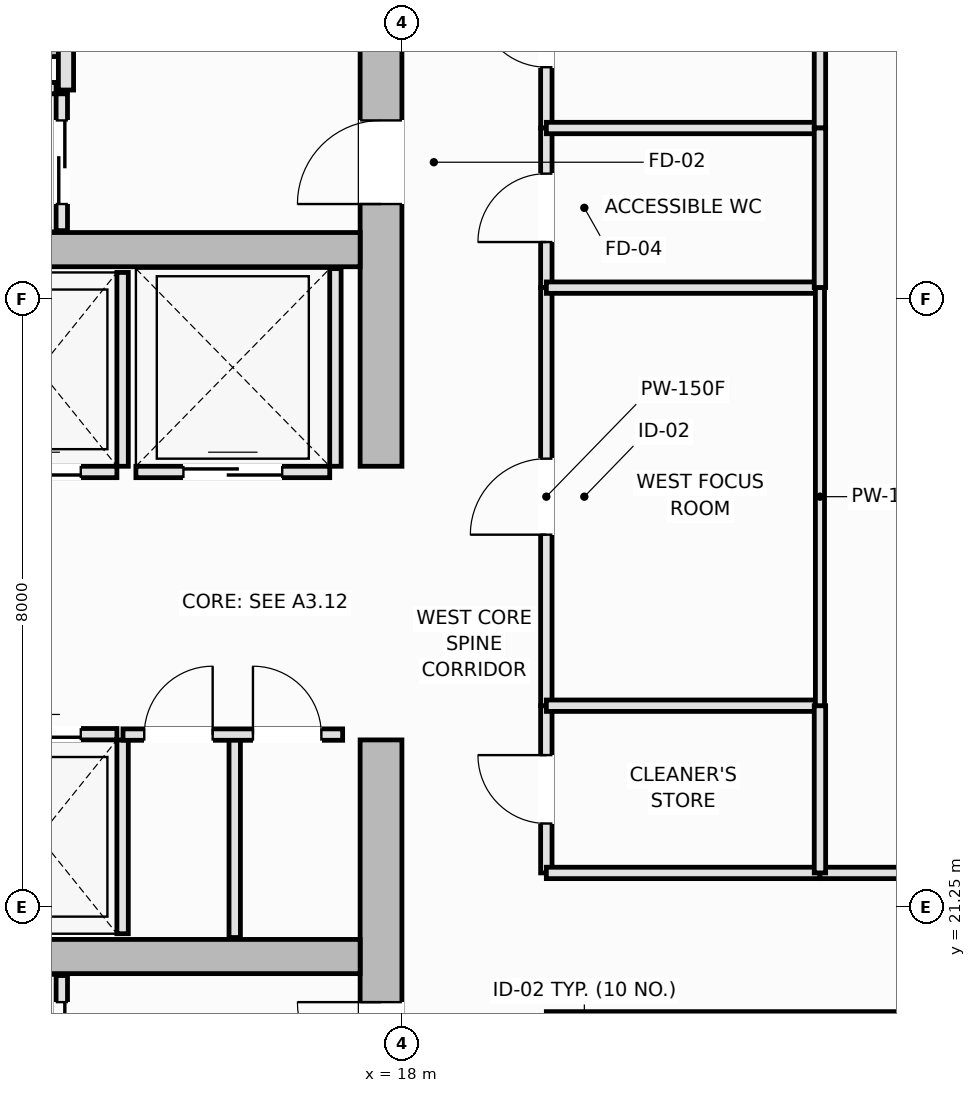
"""IFC4 building model, lengths in metres.
Left out: names, types, materials, properties, quantities, classifications, styles, units other than length and angle.
Written with IfcOpenShell. Run it as: python <this file> out.ifc"""

import sys

from ifc_helpers import new_model, si_unit, direction, frame, frame_2d, origin, place, context, subcontext, project, spatial, rectangle, extrude, element, fill, save


model = new_model("IFC4")
c1 = context("Model", 3, precision=1e-05, world=origin(), true_north=direction((0.0, 1.0)))
c2 = subcontext(c1, "Body", "Model", "MODEL_VIEW")
j1 = project(units=[si_unit("LENGTHUNIT", "METRE"), si_unit("PLANEANGLEUNIT", "RADIAN")], contexts=[c1])
p1 = place(None, origin())
s1 = spatial("IfcSite", under=j1, at=p1, CompositionType="ELEMENT")
p2 = place(p1, origin())
s2 = spatial("IfcBuilding", under=s1, at=p2, CompositionType="ELEMENT")
p3 = place(p2, frame((0.0, 0.0, 223.55)))
s3 = spatial("IfcBuildingStorey", under=s2, at=p3, CompositionType="ELEMENT", Elevation=223.55)
p4 = place(p3, frame((17.725, 14.55, 0.0), z_axis=(0.0, 0.0, 1.0), x_axis=(0.0, 1.0, 0.0)))
e1 = element("IfcWall", 1, at=p4, inside=s3, PredefinedType="SHEAR", context=c2, shape_type="SweptSolid", body=[
    extrude(rectangle(XDim=8.9, YDim=0.55, at=frame_2d((4.45, 0.0))), origin(), (0.0, 0.0, 1.0), 3.55),
])
p5 = place(p4, frame((4.35, 0.0, 0.0)))
e2 = element("IfcOpeningElement", 2, at=p5, cuts=e1, PredefinedType="OPENING", context=c2, shape_type="SweptSolid", body=[
    extrude(rectangle(XDim=1.1, YDim=2.15, at=frame_2d((0.55, 1.075))), frame((0.0, 0.285, 0.0), z_axis=(0.0, -1.0, 0.0), x_axis=(1.0, 0.0, 0.0)), (0.0, 0.0, 1.0), 0.57),
])
p6 = place(p3, frame((17.725, 27.05, 0.0), z_axis=(0.0, 0.0, 1.0), x_axis=(0.0, 1.0, 0.0)))
e3 = element("IfcWall", 3, at=p6, inside=s3, PredefinedType="SHEAR", context=c2, shape_type="SweptSolid", body=[
    extrude(rectangle(XDim=8.9, YDim=0.55, at=frame_2d((4.45, 0.0))), origin(), (0.0, 0.0, 1.0), 3.55),
])
p7 = place(p6, frame((3.45, 0.0, 0.0)))
e4 = element("IfcOpeningElement", 4, at=p7, cuts=e3, PredefinedType="OPENING", context=c2, shape_type="SweptSolid", body=[
    extrude(rectangle(XDim=1.1, YDim=2.15, at=frame_2d((0.55, 1.075))), frame((0.0, 0.285, 0.0), z_axis=(0.0, -1.0, 0.0), x_axis=(1.0, 0.0, 0.0)), (0.0, 0.0, 1.0), 0.57),
])
for number, where, z_axis, x_axis in (
    (5, (5.05, 20.6, 0.0), (0.0, 0.0, 1.0), (1.0, 0.0, 0.0)),
    (6, (5.05, 29.9, 0.0), (0.0, 0.0, 1.0), (1.0, 0.0, 0.0)),
):
    element("IfcWall", number, at=place(p3, frame(where, z_axis=z_axis, x_axis=x_axis)), inside=s3, PredefinedType="SHEAR", context=c2, shape_type="SweptSolid", body=[
        extrude(rectangle(XDim=12.4, YDim=0.45, at=frame_2d((6.2, 0.0))), origin(), (0.0, 0.0, 1.0), 3.55),
    ])
p8 = place(p3, frame((5.9, 32.54, 0.0), z_axis=(0.0, 0.0, 1.0), x_axis=(1.0, 0.0, 0.0)))
e7 = element("IfcWall", 7, at=p8, inside=s3, PredefinedType="SOLIDWALL", context=c2, shape_type="SweptSolid", body=[
    extrude(rectangle(XDim=7.66, YDim=0.2, at=frame_2d((3.83, 0.0))), origin(), (0.0, 0.0, 1.0), 3.55),
])
p9 = place(p3, frame((12.2, 23.525, 0.0), z_axis=(0.0, 0.0, 1.0), x_axis=(1.0, 0.0, 0.0)))
e8 = element("IfcWall", 8, at=p9, inside=s3, PredefinedType="PARTITIONING", context=c2, shape_type="SweptSolid", body=[
    extrude(rectangle(XDim=2.05, YDim=0.15, at=frame_2d((1.025, 0.0))), origin(), (0.0, 0.0, 1.0), 3.37),
])
p10 = place(p9, frame((0.475, 0.0, 0.0)))
e9 = element("IfcOpeningElement", 9, at=p10, cuts=e8, PredefinedType="OPENING", context=c2, shape_type="SweptSolid", body=[
    extrude(rectangle(XDim=1.1, YDim=2.2, at=frame_2d((0.55, 1.1))), frame((0.0, 0.085, 0.0), z_axis=(0.0, -1.0, 0.0), x_axis=(1.0, 0.0, 0.0)), (0.0, 0.0, 1.0), 0.17),
])
p11 = place(p3, frame((14.325, 20.9, 0.0), z_axis=(0.0, 0.0, 1.0), x_axis=(0.0, 1.0, 0.0)))
e10 = element("IfcWall", 10, at=p11, inside=s3, PredefinedType="PARTITIONING", context=c2, shape_type="SweptSolid", body=[
    extrude(rectangle(XDim=2.55, YDim=0.15, at=frame_2d((1.275, 0.0))), origin(), (0.0, 0.0, 1.0), 3.37),
])
p12 = place(p3, frame((12.2, 26.975, 0.0), z_axis=(0.0, 0.0, 1.0), x_axis=(1.0, 0.0, 0.0)))
e11 = element("IfcWall", 11, at=p12, inside=s3, PredefinedType="PARTITIONING", context=c2, shape_type="SweptSolid", body=[
    extrude(rectangle(XDim=2.05, YDim=0.15, at=frame_2d((1.025, 0.0))), origin(), (0.0, 0.0, 1.0), 3.37),
])
p13 = place(p12, frame((0.475, 0.0, 0.0)))
e12 = element("IfcOpeningElement", 12, at=p13, cuts=e11, PredefinedType="OPENING", context=c2, shape_type="SweptSolid", body=[
    extrude(rectangle(XDim=1.1, YDim=2.2, at=frame_2d((0.55, 1.1))), frame((0.0, 0.085, 0.0), z_axis=(0.0, -1.0, 0.0), x_axis=(1.0, 0.0, 0.0)), (0.0, 0.0, 1.0), 0.17),
])
p14 = place(p3, frame((14.325, 27.05, 0.0), z_axis=(0.0, 0.0, 1.0), x_axis=(0.0, 1.0, 0.0)))
e13 = element("IfcWall", 13, at=p14, inside=s3, PredefinedType="PARTITIONING", context=c2, shape_type="SweptSolid", body=[
    extrude(rectangle(XDim=2.55, YDim=0.15, at=frame_2d((1.275, 0.0))), origin(), (0.0, 0.0, 1.0), 3.37),
])
p15 = place(p3, frame((14.5, 26.975, 0.0), z_axis=(0.0, 0.0, 1.0), x_axis=(1.0, 0.0, 0.0)))
e14 = element("IfcWall", 14, at=p15, inside=s3, PredefinedType="PARTITIONING", context=c2, shape_type="SweptSolid", body=[
    extrude(rectangle(XDim=2.55, YDim=0.15, at=frame_2d((1.275, 0.0))), origin(), (0.0, 0.0, 1.0), 3.37),
])
p16 = place(p15, frame((0.625, 0.0, 0.0)))
e15 = element("IfcOpeningElement", 15, at=p16, cuts=e14, PredefinedType="OPENING", context=c2, shape_type="SweptSolid", body=[
    extrude(rectangle(XDim=1.3, YDim=2.2, at=frame_2d((0.65, 1.1))), frame((0.0, 0.085, 0.0), z_axis=(0.0, -1.0, 0.0), x_axis=(1.0, 0.0, 0.0)), (0.0, 0.0, 1.0), 0.17),
])
p17 = place(p3, frame((17.125, 27.05, 0.0), z_axis=(0.0, 0.0, 1.0), x_axis=(0.0, 1.0, 0.0)))
e16 = element("IfcWall", 16, at=p17, inside=s3, PredefinedType="PARTITIONING", context=c2, shape_type="SweptSolid", body=[
    extrude(rectangle(XDim=2.6, YDim=0.15, at=frame_2d((1.3, 0.0))), origin(), (0.0, 0.0, 1.0), 3.37),
])
p18 = place(p3, frame((13.525, 18.55, 0.0), z_axis=(0.0, 0.0, 1.0), x_axis=(0.0, 1.0, 0.0)))
e17 = element("IfcWall", 17, at=p18, inside=s3, PredefinedType="PARTITIONING", context=c2, shape_type="SweptSolid", body=[
    extrude(rectangle(XDim=1.8, YDim=0.15, at=frame_2d((0.9, 0.0))), origin(), (0.0, 0.0, 1.0), 3.37),
])
p19 = place(p18, frame((0.35, 0.0, 0.0)))
e18 = element("IfcOpeningElement", 18, at=p19, cuts=e17, PredefinedType="OPENING", context=c2, shape_type="SweptSolid", body=[
    extrude(rectangle(XDim=1.1, YDim=2.2, at=frame_2d((0.55, 1.1))), frame((0.0, 0.085, 0.0), z_axis=(0.0, -1.0, 0.0), x_axis=(1.0, 0.0, 0.0)), (0.0, 0.0, 1.0), 0.17),
])
p20 = place(p3, frame((10.95, 32.025, 0.0), z_axis=(0.0, 0.0, 1.0), x_axis=(1.0, 0.0, 0.0)))
e19 = element("IfcWall", 19, at=p20, inside=s3, PredefinedType="PARTITIONING", context=c2, shape_type="SweptSolid", body=[
    extrude(rectangle(XDim=2.5, YDim=0.15, at=frame_2d((1.25, 0.0))), origin(), (0.0, 0.0, 1.0), 3.37),
])
p21 = place(p3, frame((13.525, 30.15, 0.0), z_axis=(0.0, 0.0, 1.0), x_axis=(0.0, 1.0, 0.0)))
e20 = element("IfcWall", 20, at=p21, inside=s3, PredefinedType="PARTITIONING", context=c2, shape_type="SweptSolid", body=[
    extrude(rectangle(XDim=1.8, YDim=0.15, at=frame_2d((0.9, 0.0))), origin(), (0.0, 0.0, 1.0), 3.37),
])
p22 = place(p21, frame((0.35, 0.0, 0.0)))
e21 = element("IfcOpeningElement", 21, at=p22, cuts=e20, PredefinedType="OPENING", context=c2, shape_type="SweptSolid", body=[
    extrude(rectangle(XDim=1.1, YDim=2.2, at=frame_2d((0.55, 1.1))), frame((0.0, 0.085, 0.0), z_axis=(0.0, -1.0, 0.0), x_axis=(1.0, 0.0, 0.0)), (0.0, 0.0, 1.0), 0.17),
])
p23 = place(p3, frame((13.58, 32.0, 0.0), z_axis=(0.0, 0.0, 1.0), x_axis=(0.0, 1.0, 0.0)))
e22 = element("IfcWall", 22, at=p23, inside=s3, PredefinedType="PARTITIONING", context=c2, shape_type="SweptSolid", body=[
    extrude(rectangle(XDim=0.54, YDim=0.2, at=frame_2d((0.27, 0.0))), origin(), (0.0, 0.0, 1.0), 3.37),
])
p24 = place(p3, frame((15.8, 20.85, 0.0), z_axis=(0.0, 0.0, 1.0), x_axis=(0.0, 1.0, 0.0)))
e23 = element("IfcWall", 23, at=p24, inside=s3, PredefinedType="PARTITIONING", context=c2, shape_type="SweptSolid", body=[
    extrude(rectangle(XDim=2.67, YDim=0.15, at=frame_2d((1.335, 0.0))), origin(), (0.0, 0.0, 1.0), 3.37),
])
p25 = place(p3, frame((14.33, 23.52, 0.0), z_axis=(0.0, 0.0, 1.0), x_axis=(1.0, 0.0, 0.0)))
e24 = element("IfcWall", 24, at=p25, inside=s3, PredefinedType="PARTITIONING", context=c2, shape_type="SweptSolid", body=[
    extrude(rectangle(XDim=2.89, YDim=0.15, at=frame_2d((1.445, 0.0))), origin(), (0.0, 0.0, 1.0), 3.37),
])
p26 = place(p25, frame((0.28, 0.0, 0.0)))
e25 = element("IfcOpeningElement", 25, at=p26, cuts=e24, PredefinedType="OPENING", context=c2, shape_type="SweptSolid", body=[
    extrude(rectangle(XDim=0.9, YDim=2.1, at=frame_2d((0.45, 1.05))), frame((0.0, 0.085, 0.0), z_axis=(0.0, -1.0, 0.0), x_axis=(1.0, 0.0, 0.0)), (0.0, 0.0, 1.0), 0.17),
])
p27 = place(p25, frame((1.71, 0.0, 0.0)))
e26 = element("IfcOpeningElement", 26, at=p27, cuts=e24, PredefinedType="OPENING", context=c2, shape_type="SweptSolid", body=[
    extrude(rectangle(XDim=0.9, YDim=2.1, at=frame_2d((0.45, 1.05))), frame((0.0, 0.085, 0.0), z_axis=(0.0, -1.0, 0.0), x_axis=(1.0, 0.0, 0.0)), (0.0, 0.0, 1.0), 0.17),
])
p28 = place(p3, frame((19.9, 31.5, 0.0), z_axis=(0.0, 0.0, 1.0), x_axis=(0.0, 1.0, 0.0)))
e27 = element("IfcWall", 27, at=p28, inside=s3, PredefinedType="PLUMBINGWALL", context=c2, shape_type="SweptSolid", body=[
    extrude(rectangle(XDim=2.5, YDim=0.15, at=frame_2d((1.25, 0.0))), origin(), (0.0, 0.0, 1.0), 3.37),
])
p29 = place(p28, frame((0.8, 0.0, 0.0)))
e28 = element("IfcOpeningElement", 28, at=p29, cuts=e27, PredefinedType="OPENING", context=c2, shape_type="SweptSolid", body=[
    extrude(rectangle(XDim=0.9, YDim=2.1, at=frame_2d((0.45, 1.05))), frame((0.0, 0.085, 0.0), z_axis=(0.0, -1.0, 0.0), x_axis=(1.0, 0.0, 0.0)), (0.0, 0.0, 1.0), 0.17),
])
p30 = place(p3, frame((19.9, 29.4, 0.0), z_axis=(0.0, 0.0, 1.0), x_axis=(0.0, 1.0, 0.0)))
e29 = element("IfcWall", 29, at=p30, inside=s3, PredefinedType="PLUMBINGWALL", context=c2, shape_type="SweptSolid", body=[
    extrude(rectangle(XDim=2.1, YDim=0.15, at=frame_2d((1.05, 0.0))), origin(), (0.0, 0.0, 1.0), 3.37),
])
p31 = place(p30, frame((0.6, 0.0, 0.0)))
e30 = element("IfcOpeningElement", 30, at=p31, cuts=e29, PredefinedType="OPENING", context=c2, shape_type="SweptSolid", body=[
    extrude(rectangle(XDim=0.9, YDim=2.1, at=frame_2d((0.45, 1.05))), frame((0.0, 0.085, 0.0), z_axis=(0.0, -1.0, 0.0), x_axis=(1.0, 0.0, 0.0)), (0.0, 0.0, 1.0), 0.17),
])
p32 = place(p3, frame((19.9, 21.7, 0.0), z_axis=(0.0, 0.0, 1.0), x_axis=(0.0, 1.0, 0.0)))
e31 = element("IfcWall", 31, at=p32, inside=s3, PredefinedType="PLUMBINGWALL", context=c2, shape_type="SweptSolid", body=[
    extrude(rectangle(XDim=2.2, YDim=0.15, at=frame_2d((1.1, 0.0))), origin(), (0.0, 0.0, 1.0), 3.37),
])
p33 = place(p32, frame((0.65, 0.0, 0.0)))
e32 = element("IfcOpeningElement", 32, at=p33, cuts=e31, PredefinedType="OPENING", context=c2, shape_type="SweptSolid", body=[
    extrude(rectangle(XDim=0.9, YDim=2.1, at=frame_2d((0.45, 1.05))), frame((0.0, 0.085, 0.0), z_axis=(0.0, -1.0, 0.0), x_axis=(1.0, 0.0, 0.0)), (0.0, 0.0, 1.0), 0.17),
])
p34 = place(p3, frame((19.9, 23.9, 0.0), z_axis=(0.0, 0.0, 1.0), x_axis=(0.0, 1.0, 0.0)))
e33 = element("IfcWall", 33, at=p34, inside=s3, PredefinedType="PARTITIONING", context=c2, shape_type="SweptSolid", body=[
    extrude(rectangle(XDim=5.5, YDim=0.15, at=frame_2d((2.75, 0.0))), origin(), (0.0, 0.0, 1.0), 3.37),
])
p35 = place(p34, frame((2.25, 0.0, 0.0)))
e34 = element("IfcOpeningElement", 34, at=p35, cuts=e33, PredefinedType="OPENING", context=c2, shape_type="SweptSolid", body=[
    extrude(rectangle(XDim=1.0, YDim=2.15, at=frame_2d((0.5, 1.075))), frame((0.0, 0.085, 0.0), z_axis=(0.0, -1.0, 0.0), x_axis=(1.0, 0.0, 0.0)), (0.0, 0.0, 1.0), 0.17),
])
p36 = place(p3, frame((19.9, 19.8, 0.0), z_axis=(0.0, 0.0, 1.0), x_axis=(1.0, 0.0, 0.0)))
e35 = element("IfcWall", 35, at=p36, inside=s3, PredefinedType="PARTITIONING", context=c2, shape_type="SweptSolid", body=[
    extrude(rectangle(XDim=6.23, YDim=0.15, at=frame_2d((3.115, 0.0))), origin(), (0.0, 0.0, 1.0), 3.37),
])
p37 = place(p3, frame((19.9, 21.7, 0.0), z_axis=(0.0, 0.0, 1.0), x_axis=(1.0, 0.0, 0.0)))
e36 = element("IfcWall", 36, at=p37, inside=s3, PredefinedType="PLUMBINGWALL", context=c2, shape_type="SweptSolid", body=[
    extrude(rectangle(XDim=3.6, YDim=0.15, at=frame_2d((1.8, 0.0))), origin(), (0.0, 0.0, 1.0), 3.37),
])
p38 = place(p3, frame((23.5, 21.7, 0.0), z_axis=(0.0, 0.0, 1.0), x_axis=(1.0, 0.0, 0.0)))
e37 = element("IfcWall", 37, at=p38, inside=s3, PredefinedType="PARTITIONING", context=c2, shape_type="SweptSolid", body=[
    extrude(rectangle(XDim=12.8, YDim=0.15, at=frame_2d((6.4, 0.0))), origin(), (0.0, 0.0, 1.0), 3.37),
])
p39 = place(p38, frame((5.9, 0.0, 0.0)))
e38 = element("IfcOpeningElement", 38, at=p39, cuts=e37, PredefinedType="OPENING", context=c2, shape_type="SweptSolid", body=[
    extrude(rectangle(XDim=1.0, YDim=2.15, at=frame_2d((0.5, 1.075))), frame((0.0, 0.085, 0.0), z_axis=(0.0, -1.0, 0.0), x_axis=(1.0, 0.0, 0.0)), (0.0, 0.0, 1.0), 0.17),
])
p40 = place(p3, frame((19.9, 31.5, 0.0), z_axis=(0.0, 0.0, 1.0), x_axis=(1.0, 0.0, 0.0)))
e39 = element("IfcWall", 39, at=p40, inside=s3, PredefinedType="PLUMBINGWALL", context=c2, shape_type="SweptSolid", body=[
    extrude(rectangle(XDim=3.6, YDim=0.15, at=frame_2d((1.8, 0.0))), origin(), (0.0, 0.0, 1.0), 3.37),
])
p41 = place(p3, frame((23.5, 31.5, 0.0), z_axis=(0.0, 0.0, 1.0), x_axis=(0.0, 1.0, 0.0)))
e40 = element("IfcWall", 40, at=p41, inside=s3, PredefinedType="PLUMBINGWALL", context=c2, shape_type="SweptSolid", body=[
    extrude(rectangle(XDim=1.2, YDim=0.15, at=frame_2d((0.6, 0.0))), origin(), (0.0, 0.0, 1.0), 3.37),
])
p42 = place(p3, frame((19.9, 29.4, 0.0), z_axis=(0.0, 0.0, 1.0), x_axis=(1.0, 0.0, 0.0)))
e41 = element("IfcWall", 41, at=p42, inside=s3, PredefinedType="PLUMBINGWALL", context=c2, shape_type="SweptSolid", body=[
    extrude(rectangle(XDim=3.6, YDim=0.15, at=frame_2d((1.8, 0.0))), origin(), (0.0, 0.0, 1.0), 3.37),
])
p43 = place(p3, frame((23.5, 29.4, 0.0), z_axis=(0.0, 0.0, 1.0), x_axis=(0.0, 1.0, 0.0)))
e42 = element("IfcWall", 42, at=p43, inside=s3, PredefinedType="PLUMBINGWALL", context=c2, shape_type="SweptSolid", body=[
    extrude(rectangle(XDim=2.1, YDim=0.15, at=frame_2d((1.05, 0.0))), origin(), (0.0, 0.0, 1.0), 3.37),
])
p44 = place(p3, frame((19.9, 23.9, 0.0), z_axis=(0.0, 0.0, 1.0), x_axis=(1.0, 0.0, 0.0)))
e43 = element("IfcWall", 43, at=p44, inside=s3, PredefinedType="PLUMBINGWALL", context=c2, shape_type="SweptSolid", body=[
    extrude(rectangle(XDim=3.6, YDim=0.15, at=frame_2d((1.8, 0.0))), origin(), (0.0, 0.0, 1.0), 3.37),
])
p45 = place(p3, frame((23.5, 21.7, 0.0), z_axis=(0.0, 0.0, 1.0), x_axis=(0.0, 1.0, 0.0)))
e44 = element("IfcWall", 44, at=p45, inside=s3, PredefinedType="PLUMBINGWALL", context=c2, shape_type="SweptSolid", body=[
    extrude(rectangle(XDim=2.2, YDim=0.15, at=frame_2d((1.1, 0.0))), origin(), (0.0, 0.0, 1.0), 3.37),
])
p46 = place(p3, frame((23.5, 23.9, 0.0), z_axis=(0.0, 0.0, 1.0), x_axis=(0.0, 1.0, 0.0)))
e45 = element("IfcWall", 45, at=p46, inside=s3, PredefinedType="PARTITIONING", context=c2, shape_type="SweptSolid", body=[
    extrude(rectangle(XDim=5.5, YDim=0.12, at=frame_2d((2.75, 0.0))), origin(), (0.0, 0.0, 1.0), 3.37),
])
p47 = place(p10, origin())
e46 = element("IfcDoor", 46, at=p47, inside=s3, OperationType="DOUBLE_DOOR_SLIDING", PredefinedType="DOOR", context=c2, shape_type="SweptSolid", body=[
    extrude(rectangle(XDim=1.1, YDim=2.2, at=frame_2d((0.55, 1.1))), frame((0.0, 0.025, 0.0), z_axis=(0.0, -1.0, 0.0), x_axis=(1.0, 0.0, 0.0)), (0.0, 0.0, 1.0), 0.05),
])
fill(e9, e46)
p48 = place(p13, origin())
e47 = element("IfcDoor", 47, at=p48, inside=s3, OperationType="DOUBLE_DOOR_SLIDING", PredefinedType="DOOR", context=c2, shape_type="SweptSolid", body=[
    extrude(rectangle(XDim=1.1, YDim=2.2, at=frame_2d((0.55, 1.1))), frame((0.0, 0.025, 0.0), z_axis=(0.0, -1.0, 0.0), x_axis=(1.0, 0.0, 0.0)), (0.0, 0.0, 1.0), 0.05),
])
fill(e12, e47)
p49 = place(p16, origin())
e48 = element("IfcDoor", 48, at=p49, inside=s3, OperationType="DOUBLE_DOOR_SLIDING", PredefinedType="DOOR", context=c2, shape_type="SweptSolid", body=[
    extrude(rectangle(XDim=1.3, YDim=2.2, at=frame_2d((0.65, 1.1))), frame((0.0, 0.025, 0.0), z_axis=(0.0, -1.0, 0.0), x_axis=(1.0, 0.0, 0.0)), (0.0, 0.0, 1.0), 0.05),
])
fill(e15, e48)
p50 = place(p19, origin())
e49 = element("IfcDoor", 49, at=p50, inside=s3, OperationType="DOUBLE_DOOR_SLIDING", PredefinedType="DOOR", context=c2, shape_type="SweptSolid", body=[
    extrude(rectangle(XDim=1.1, YDim=2.2, at=frame_2d((0.55, 1.1))), frame((0.0, 0.025, 0.0), z_axis=(0.0, -1.0, 0.0), x_axis=(1.0, 0.0, 0.0)), (0.0, 0.0, 1.0), 0.05),
])
fill(e18, e49)
p51 = place(p22, origin())
e50 = element("IfcDoor", 50, at=p51, inside=s3, OperationType="DOUBLE_DOOR_SLIDING", PredefinedType="DOOR", context=c2, shape_type="SweptSolid", body=[
    extrude(rectangle(XDim=1.1, YDim=2.2, at=frame_2d((0.55, 1.1))), frame((0.0, 0.025, 0.0), z_axis=(0.0, -1.0, 0.0), x_axis=(1.0, 0.0, 0.0)), (0.0, 0.0, 1.0), 0.05),
])
fill(e21, e50)
p52 = place(p5, origin())
e51 = element("IfcDoor", 51, at=p52, inside=s3, OperationType="SINGLE_SWING_RIGHT", PredefinedType="DOOR", context=c2, shape_type="SweptSolid", body=[
    extrude(rectangle(XDim=1.1, YDim=2.15, at=frame_2d((0.55, 1.075))), frame((0.0, 0.025, 0.0), z_axis=(0.0, -1.0, 0.0), x_axis=(1.0, 0.0, 0.0)), (0.0, 0.0, 1.0), 0.05),
])
fill(e2, e51)
p53 = place(p7, origin())
e52 = element("IfcDoor", 52, at=p53, inside=s3, OperationType="SINGLE_SWING_LEFT", PredefinedType="DOOR", context=c2, shape_type="SweptSolid", body=[
    extrude(rectangle(XDim=1.1, YDim=2.15, at=frame_2d((0.55, 1.075))), frame((0.0, 0.025, 0.0), z_axis=(0.0, -1.0, 0.0), x_axis=(1.0, 0.0, 0.0)), (0.0, 0.0, 1.0), 0.05),
])
fill(e4, e52)
p54 = place(p26, origin())
e53 = element("IfcDoor", 53, at=p54, inside=s3, OperationType="SINGLE_SWING_RIGHT", PredefinedType="DOOR", context=c2, shape_type="SweptSolid", body=[
    extrude(rectangle(XDim=0.9, YDim=2.1, at=frame_2d((0.45, 1.05))), frame((0.0, 0.025, 0.0), z_axis=(0.0, -1.0, 0.0), x_axis=(1.0, 0.0, 0.0)), (0.0, 0.0, 1.0), 0.05),
])
fill(e25, e53)
p55 = place(p27, origin())
e54 = element("IfcDoor", 54, at=p55, inside=s3, OperationType="SINGLE_SWING_LEFT", PredefinedType="DOOR", context=c2, shape_type="SweptSolid", body=[
    extrude(rectangle(XDim=0.9, YDim=2.1, at=frame_2d((0.45, 1.05))), frame((0.0, 0.025, 0.0), z_axis=(0.0, -1.0, 0.0), x_axis=(1.0, 0.0, 0.0)), (0.0, 0.0, 1.0), 0.05),
])
fill(e26, e54)
p56 = place(p29, origin())
e55 = element("IfcDoor", 55, at=p56, inside=s3, OperationType="SINGLE_SWING_RIGHT", PredefinedType="DOOR", context=c2, shape_type="SweptSolid", body=[
    extrude(rectangle(XDim=0.9, YDim=2.1, at=frame_2d((0.45, 1.05))), frame((0.0, 0.025, 0.0), z_axis=(0.0, -1.0, 0.0), x_axis=(1.0, 0.0, 0.0)), (0.0, 0.0, 1.0), 0.05),
])
fill(e28, e55)
p57 = place(p31, origin())
e56 = element("IfcDoor", 56, at=p57, inside=s3, OperationType="SINGLE_SWING_LEFT", PredefinedType="DOOR", context=c2, shape_type="SweptSolid", body=[
    extrude(rectangle(XDim=0.9, YDim=2.1, at=frame_2d((0.45, 1.05))), frame((0.0, 0.025, 0.0), z_axis=(0.0, -1.0, 0.0), x_axis=(1.0, 0.0, 0.0)), (0.0, 0.0, 1.0), 0.05),
])
fill(e30, e56)
p58 = place(p33, origin())
e57 = element("IfcDoor", 57, at=p58, inside=s3, OperationType="SINGLE_SWING_RIGHT", PredefinedType="DOOR", context=c2, shape_type="SweptSolid", body=[
    extrude(rectangle(XDim=0.9, YDim=2.1, at=frame_2d((0.45, 1.05))), frame((0.0, 0.025, 0.0), z_axis=(0.0, -1.0, 0.0), x_axis=(1.0, 0.0, 0.0)), (0.0, 0.0, 1.0), 0.05),
])
fill(e32, e57)
p59 = place(p35, origin())
e58 = element("IfcDoor", 58, at=p59, inside=s3, OperationType="SINGLE_SWING_LEFT", PredefinedType="DOOR", context=c2, shape_type="SweptSolid", body=[
    extrude(rectangle(XDim=1.0, YDim=2.15, at=frame_2d((0.5, 1.075))), frame((0.0, 0.025, 0.0), z_axis=(0.0, -1.0, 0.0), x_axis=(1.0, 0.0, 0.0)), (0.0, 0.0, 1.0), 0.05),
])
fill(e34, e58)
save(model, sys.argv[1])
